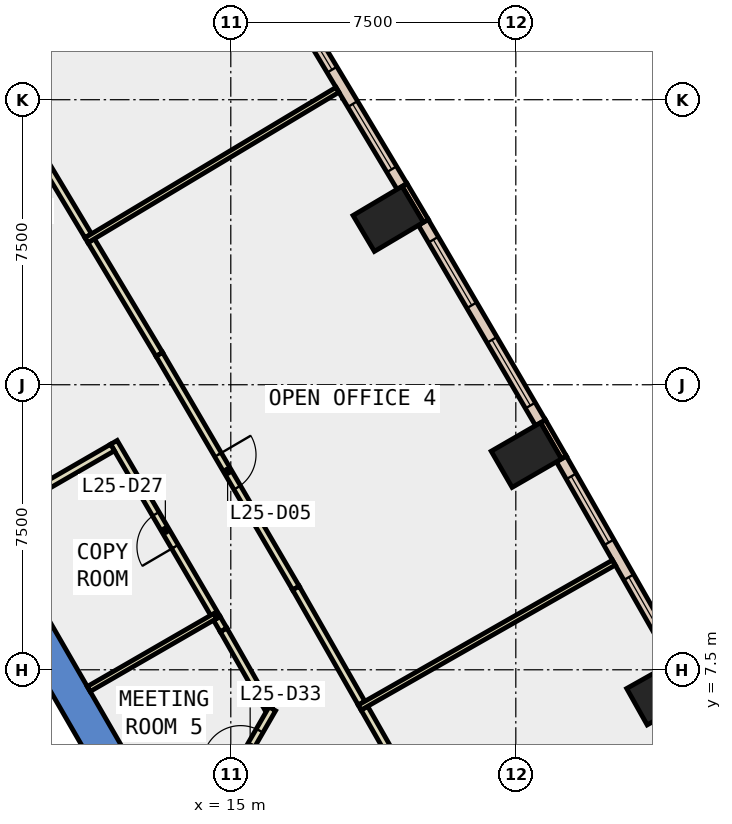
"""IFC4 building model, lengths in metres.
Left out: names, types, materials, properties, quantities, classifications, styles, units other than length and angle.
Written with IfcOpenShell. Run it as: python <this file> out.ifc"""

import sys

from ifc_helpers import new_model, si_unit, direction, frame, frame_2d, origin, origin_2d, place, context, subcontext, project, spatial, polyline, rectangle, outline, extrude, element, fill, save


model = new_model("IFC4")
c1 = context("Model", 3, precision=1e-05, world=origin(), true_north=direction((0.0, 1.0)))
c2 = subcontext(c1, "Body", "Model", "MODEL_VIEW")
j1 = project(units=[si_unit("LENGTHUNIT", "METRE"), si_unit("PLANEANGLEUNIT", "RADIAN")], contexts=[c1])
p1 = place(None, origin())
s1 = spatial("IfcSite", under=j1, at=p1, CompositionType="ELEMENT")
p2 = place(p1, origin())
s2 = spatial("IfcBuilding", under=s1, at=p2, CompositionType="ELEMENT")
p3 = place(p2, frame((0.0, 0.0, 116.0)))
s3 = spatial("IfcBuildingStorey", under=s2, at=p3, CompositionType="ELEMENT", Elevation=116.0)
for number, where, z_axis, x_axis in (
    (1, (26.341, 6.896, -0.4), (0.0, 0.0, 1.0), (-0.49, 0.872, 0.0)),
    (2, (22.777, 13.15, -0.4), (0.0, 0.0, 1.0), (-0.5, 0.866, 0.0)),
    (3, (19.143, 19.364, -0.4), (0.0, 0.0, 1.0), (-0.51, 0.86, 0.0)),
):
    element("IfcColumn", number, at=place(p3, frame(where, z_axis=z_axis, x_axis=x_axis)), inside=s3, PredefinedType="COLUMN", context=c2, shape_type="SweptSolid", body=[
        extrude(rectangle(XDim=1.1, YDim=1.5, at=origin_2d()), origin(), (0.0, 0.0, 1.0), 4.2),
    ])
p4 = place(p3, frame((0.0, 0.0, -0.4)))
e4 = element("IfcWall", 4, at=p4, inside=s3, PredefinedType="SHEAR", context=c2, shape_type="SweptSolid", body=[
    extrude(outline(polyline([(8.517, 11.748), (7.738, 11.298), (12.817, 2.5), (13.856, 2.5), (8.517, 11.748)])), origin(), (0.0, 0.0, 1.0), 4.2),
])
p5 = place(p3, frame((23.766, 13.086, 0.0), z_axis=(0.0, 0.0, 1.0), x_axis=(-0.499837685251, 0.86611909597, 0.0)))
e5 = element("IfcWall", 5, at=p5, inside=s3, PredefinedType="STANDARD", context=c2, shape_type="SweptSolid", body=[
    extrude(rectangle(XDim=1.1, YDim=0.15, at=frame_2d((0.55, 0.0))), origin(), (0.0, 0.0, 1.0), 3.8),
])
p6 = place(p3, frame((20.133, 19.312, 0.0), z_axis=(0.0, 0.0, 1.0), x_axis=(-0.510082245696, 0.860125631885, 0.0)))
e6 = element("IfcWall", 6, at=p6, inside=s3, PredefinedType="STANDARD", context=c2, shape_type="SweptSolid", body=[
    extrude(rectangle(XDim=1.1, YDim=0.15, at=frame_2d((0.55, 0.0))), origin(), (0.0, 0.0, 1.0), 3.8),
])
p7 = place(p3, frame((26.723, 7.74, 0.0), z_axis=(0.0, 0.0, 1.0), x_axis=(-0.495114366991, 0.868827810098, 0.0)))
e7 = element("IfcWall", 7, at=p7, inside=s3, PredefinedType="STANDARD", context=c2, shape_type="SweptSolid", body=[
    extrude(rectangle(XDim=6.11, YDim=0.3, at=frame_2d((3.055, 0.0))), origin(), (0.0, 0.0, 1.0), 3.8),
])
p8 = place(p7, frame((0.527, 0.0, 0.9)))
e8 = element("IfcOpeningElement", 8, at=p8, cuts=e7, PredefinedType="OPENING", context=c2, shape_type="SweptSolid", body=[
    extrude(rectangle(XDim=2.0, YDim=2.6, at=frame_2d((1.0, 1.3))), frame((0.0, 0.16, 0.0), z_axis=(0.0, -1.0, 0.0), x_axis=(1.0, 0.0, 0.0)), (0.0, 0.0, 1.0), 0.32),
])
p9 = place(p7, frame((3.582, 0.0, 0.9)))
e9 = element("IfcOpeningElement", 9, at=p9, cuts=e7, PredefinedType="OPENING", context=c2, shape_type="SweptSolid", body=[
    extrude(rectangle(XDim=2.0, YDim=2.6, at=frame_2d((1.0, 1.3))), frame((0.0, 0.16, 0.0), z_axis=(0.0, -1.0, 0.0), x_axis=(1.0, 0.0, 0.0)), (0.0, 0.0, 1.0), 0.32),
])
p10 = place(p3, frame((23.149, 13.999, 0.0), z_axis=(0.0, 0.0, 1.0), x_axis=(-0.504790055126, 0.863242144619, 0.0)))
e10 = element("IfcWall", 10, at=p10, inside=s3, PredefinedType="STANDARD", context=c2, shape_type="SweptSolid", body=[
    extrude(rectangle(XDim=6.109, YDim=0.3, at=frame_2d((3.055, 0.0))), origin(), (0.0, 0.0, 1.0), 3.8),
])
p11 = place(p10, frame((0.527, 0.0, 0.9)))
e11 = element("IfcOpeningElement", 11, at=p11, cuts=e10, PredefinedType="OPENING", context=c2, shape_type="SweptSolid", body=[
    extrude(rectangle(XDim=2.0, YDim=2.6, at=frame_2d((1.0, 1.3))), frame((0.0, 0.16, 0.0), z_axis=(0.0, -1.0, 0.0), x_axis=(1.0, 0.0, 0.0)), (0.0, 0.0, 1.0), 0.32),
])
p12 = place(p10, frame((3.582, 0.0, 0.9)))
e12 = element("IfcOpeningElement", 12, at=p12, cuts=e10, PredefinedType="OPENING", context=c2, shape_type="SweptSolid", body=[
    extrude(rectangle(XDim=2.0, YDim=2.6, at=frame_2d((1.0, 1.3))), frame((0.0, 0.16, 0.0), z_axis=(0.0, -1.0, 0.0), x_axis=(1.0, 0.0, 0.0)), (0.0, 0.0, 1.0), 0.32),
])
p13 = place(p3, frame((19.506, 20.217, 0.0), z_axis=(0.0, 0.0, 1.0), x_axis=(-0.514078503149, 0.857743139057, 0.0)))
e13 = element("IfcWall", 13, at=p13, inside=s3, PredefinedType="STANDARD", context=c2, shape_type="SweptSolid", body=[
    extrude(rectangle(XDim=6.11, YDim=0.3, at=frame_2d((3.055, 0.0))), origin(), (0.0, 0.0, 1.0), 3.8),
])
p14 = place(p13, frame((0.528, 0.0, 0.9)))
e14 = element("IfcOpeningElement", 14, at=p14, cuts=e13, PredefinedType="OPENING", context=c2, shape_type="SweptSolid", body=[
    extrude(rectangle(XDim=2.0, YDim=2.6, at=frame_2d((1.0, 1.3))), frame((0.0, 0.16, 0.0), z_axis=(0.0, -1.0, 0.0), x_axis=(1.0, 0.0, 0.0)), (0.0, 0.0, 1.0), 0.32),
])
p15 = place(p13, frame((3.583, 0.0, 0.9)))
e15 = element("IfcOpeningElement", 15, at=p15, cuts=e13, PredefinedType="OPENING", context=c2, shape_type="SweptSolid", body=[
    extrude(rectangle(XDim=2.0, YDim=2.6, at=frame_2d((1.0, 1.3))), frame((0.0, 0.16, 0.0), z_axis=(0.0, -1.0, 0.0), x_axis=(1.0, 0.0, 0.0)), (0.0, 0.0, 1.0), 0.32),
])
p16 = place(p3, frame((15.993, 6.473, 0.0), z_axis=(0.0, 0.0, 1.0), x_axis=(-0.495159881733, 0.86880187127, 0.0)))
e16 = element("IfcWall", 16, at=p16, inside=s3, PredefinedType="PARTITIONING", context=c2, shape_type="SweptSolid", body=[
    extrude(rectangle(XDim=2.391, YDim=0.2, at=frame_2d((1.195, 0.0))), origin(), (0.0, 0.0, 1.0), 3.8),
])
p17 = place(p3, frame((14.809, 8.55, 0.0), z_axis=(0.0, 0.0, 1.0), x_axis=(-0.50443330283, 0.86345066043, 0.0)))
e17 = element("IfcWall", 17, at=p17, inside=s3, PredefinedType="PARTITIONING", context=c2, shape_type="SweptSolid", body=[
    extrude(rectangle(XDim=0.351, YDim=0.2, at=frame_2d((0.175, 0.0))), origin(), (0.0, 0.0, 1.0), 3.8),
])
p18 = place(p3, frame((14.632, 8.853, 0.0), z_axis=(0.0, 0.0, 1.0), x_axis=(-0.504798859257, 0.863236996249, 0.0)))
e18 = element("IfcWall", 18, at=p18, inside=s3, PredefinedType="PARTITIONING", context=c2, shape_type="SweptSolid", body=[
    extrude(rectangle(XDim=5.365, YDim=0.2, at=frame_2d((2.682, 0.0))), origin(), (0.0, 0.0, 1.0), 3.8),
])
p19 = place(p18, frame((2.182, 0.0, 0.0)))
e19 = element("IfcOpeningElement", 19, at=p19, cuts=e18, PredefinedType="OPENING", context=c2, shape_type="SweptSolid", body=[
    extrude(rectangle(XDim=1.0, YDim=2.1, at=frame_2d((0.5, 1.05))), frame((0.0, 0.11, 0.0), z_axis=(0.0, -1.0, 0.0), x_axis=(1.0, 0.0, 0.0)), (0.0, 0.0, 1.0), 0.22),
])
p20 = place(p3, frame((11.888, 13.348, 0.0), z_axis=(0.0, 0.0, 1.0), x_axis=(-0.865959227195, -0.500114603702, 0.0)))
e20 = element("IfcWall", 20, at=p20, inside=s3, PredefinedType="PARTITIONING", context=c2, shape_type="SweptSolid", body=[
    extrude(rectangle(XDim=3.269, YDim=0.2, at=frame_2d((1.635, 0.0))), origin(), (0.0, 0.0, 1.0), 3.8),
])
p21 = place(p3, frame((18.515, 6.491, 0.0), z_axis=(0.0, 0.0, 1.0), x_axis=(0.495309264725, -0.868716715781, 0.0)))
e21 = element("IfcWall", 21, at=p21, inside=s3, PredefinedType="PARTITIONING", context=c2, shape_type="SweptSolid", body=[
    extrude(rectangle(XDim=3.487, YDim=0.2, at=frame_2d((1.743, 0.0))), origin(), (0.0, 0.0, 1.0), 3.8),
])
p22 = place(p3, frame((11.326, 18.79, 0.0), z_axis=(0.0, 0.0, 1.0), x_axis=(0.514155958966, -0.857696712049, 0.0)))
e22 = element("IfcWall", 22, at=p22, inside=s3, PredefinedType="PARTITIONING", context=c2, shape_type="SweptSolid", body=[
    extrude(rectangle(XDim=3.487, YDim=0.2, at=frame_2d((1.744, 0.0))), origin(), (0.0, 0.0, 1.0), 3.8),
])
p23 = place(p3, frame((13.119, 15.799, 0.0), z_axis=(0.0, 0.0, 1.0), x_axis=(0.504729598075, -0.863277494684, 0.0)))
e23 = element("IfcWall", 23, at=p23, inside=s3, PredefinedType="PARTITIONING", context=c2, shape_type="SweptSolid", body=[
    extrude(rectangle(XDim=7.123, YDim=0.2, at=frame_2d((3.562, 0.0))), origin(), (0.0, 0.0, 1.0), 3.8),
])
p24 = place(p23, frame((3.061, 0.0, 0.0)))
e24 = element("IfcOpeningElement", 24, at=p24, cuts=e23, PredefinedType="OPENING", context=c2, shape_type="SweptSolid", body=[
    extrude(rectangle(XDim=1.0, YDim=2.1, at=frame_2d((0.5, 1.05))), frame((0.0, 0.11, 0.0), z_axis=(0.0, -1.0, 0.0), x_axis=(1.0, 0.0, 0.0)), (0.0, 0.0, 1.0), 0.22),
])
p25 = place(p3, frame((16.714, 9.65, 0.0), z_axis=(0.0, 0.0, 1.0), x_axis=(0.495286549488, -0.868729666753, 0.0)))
e25 = element("IfcWall", 25, at=p25, inside=s3, PredefinedType="PARTITIONING", context=c2, shape_type="SweptSolid", body=[
    extrude(rectangle(XDim=3.487, YDim=0.2, at=frame_2d((1.743, 0.0))), origin(), (0.0, 0.0, 1.0), 3.8),
])
p26 = place(p3, frame((9.457, 21.909, 0.0), z_axis=(0.0, 0.0, 1.0), x_axis=(0.513949903813, -0.857820200491, 0.0)))
e26 = element("IfcWall", 26, at=p26, inside=s3, PredefinedType="PARTITIONING", context=c2, shape_type="SweptSolid", body=[
    extrude(rectangle(XDim=3.487, YDim=0.2, at=frame_2d((1.743, 0.0))), origin(), (0.0, 0.0, 1.0), 3.8),
])
p27 = place(p3, frame((11.261, 6.994, 0.0), z_axis=(0.0, 0.0, 1.0), x_axis=(0.86605248387, 0.499953092981, 0.0)))
e27 = element("IfcWall", 27, at=p27, inside=s3, PredefinedType="PARTITIONING", context=c2, shape_type="SweptSolid", body=[
    extrude(rectangle(XDim=3.848, YDim=0.15, at=frame_2d((1.924, 0.0))), origin(), (0.0, 0.0, 1.0), 3.8),
])
p28 = place(p3, frame((13.827, 2.55, 0.0), z_axis=(0.0, 0.0, 1.0), x_axis=(0.500045913515, 0.865998893981, 0.0)))
e28 = element("IfcWall", 28, at=p28, inside=s3, PredefinedType="PARTITIONING", context=c2, shape_type="SweptSolid", body=[
    extrude(rectangle(XDim=4.53, YDim=0.2, at=frame_2d((2.265, 0.0))), origin(), (0.0, 0.0, 1.0), 3.8),
])
p29 = place(p28, frame((1.765, 0.0, 0.0)))
e29 = element("IfcOpeningElement", 29, at=p29, cuts=e28, PredefinedType="OPENING", context=c2, shape_type="SweptSolid", body=[
    extrude(rectangle(XDim=1.0, YDim=2.1, at=frame_2d((0.5, 1.05))), frame((0.0, 0.11, 0.0), z_axis=(0.0, -1.0, 0.0), x_axis=(1.0, 0.0, 0.0)), (0.0, 0.0, 1.0), 0.22),
])
p30 = place(p28, frame((2.865, 0.0, 0.0)))
e30 = element("IfcOpeningElement", 30, at=p30, cuts=e28, PredefinedType="OPENING", context=c2, shape_type="SweptSolid", body=[
    extrude(rectangle(XDim=1.0, YDim=2.1, at=frame_2d((0.5, 1.05))), frame((0.0, 0.11, 0.0), z_axis=(0.0, -1.0, 0.0), x_axis=(1.0, 0.0, 0.0)), (0.0, 0.0, 1.0), 0.22),
])
p31 = place(p3, frame((18.391, 6.506, 0.0), z_axis=(0.0, 0.0, 1.0), x_axis=(0.868738258528, 0.495271479261, 0.0)))
e31 = element("IfcWall", 31, at=p31, inside=s3, PredefinedType="PARTITIONING", context=c2, shape_type="SweptSolid", body=[
    extrude(rectangle(XDim=7.701, YDim=0.15, at=frame_2d((3.85, 0.0))), origin(), (0.0, 0.0, 1.0), 3.8),
])
p32 = place(p3, frame((11.202, 18.803, 0.0), z_axis=(0.0, 0.0, 1.0), x_axis=(0.857778149162, 0.514020084062, 0.0)))
e32 = element("IfcWall", 32, at=p32, inside=s3, PredefinedType="PARTITIONING", context=c2, shape_type="SweptSolid", body=[
    extrude(rectangle(XDim=7.7, YDim=0.15, at=frame_2d((3.85, 0.0))), origin(), (0.0, 0.0, 1.0), 3.8),
])
p33 = place(p8, origin())
e33 = element("IfcWindow", 33, at=p33, inside=s3, PartitioningType="SINGLE_PANEL", PredefinedType="WINDOW", context=c2, shape_type="SweptSolid", body=[
    extrude(rectangle(XDim=2.0, YDim=2.6, at=frame_2d((1.0, 1.3))), frame((0.0, 0.03, 0.0), z_axis=(0.0, -1.0, 0.0), x_axis=(1.0, 0.0, 0.0)), (0.0, 0.0, 1.0), 0.06),
])
fill(e8, e33)
p34 = place(p9, origin())
e34 = element("IfcWindow", 34, at=p34, inside=s3, PartitioningType="SINGLE_PANEL", PredefinedType="WINDOW", context=c2, shape_type="SweptSolid", body=[
    extrude(rectangle(XDim=2.0, YDim=2.6, at=frame_2d((1.0, 1.3))), frame((0.0, 0.03, 0.0), z_axis=(0.0, -1.0, 0.0), x_axis=(1.0, 0.0, 0.0)), (0.0, 0.0, 1.0), 0.06),
])
fill(e9, e34)
p35 = place(p11, origin())
e35 = element("IfcWindow", 35, at=p35, inside=s3, PartitioningType="SINGLE_PANEL", PredefinedType="WINDOW", context=c2, shape_type="SweptSolid", body=[
    extrude(rectangle(XDim=2.0, YDim=2.6, at=frame_2d((1.0, 1.3))), frame((0.0, 0.03, 0.0), z_axis=(0.0, -1.0, 0.0), x_axis=(1.0, 0.0, 0.0)), (0.0, 0.0, 1.0), 0.06),
])
fill(e11, e35)
p36 = place(p12, origin())
e36 = element("IfcWindow", 36, at=p36, inside=s3, PartitioningType="SINGLE_PANEL", PredefinedType="WINDOW", context=c2, shape_type="SweptSolid", body=[
    extrude(rectangle(XDim=2.0, YDim=2.6, at=frame_2d((1.0, 1.3))), frame((0.0, 0.03, 0.0), z_axis=(0.0, -1.0, 0.0), x_axis=(1.0, 0.0, 0.0)), (0.0, 0.0, 1.0), 0.06),
])
fill(e12, e36)
p37 = place(p14, origin())
e37 = element("IfcWindow", 37, at=p37, inside=s3, PartitioningType="SINGLE_PANEL", PredefinedType="WINDOW", context=c2, shape_type="SweptSolid", body=[
    extrude(rectangle(XDim=2.0, YDim=2.6, at=frame_2d((1.0, 1.3))), frame((0.0, 0.03, 0.0), z_axis=(0.0, -1.0, 0.0), x_axis=(1.0, 0.0, 0.0)), (0.0, 0.0, 1.0), 0.06),
])
fill(e14, e37)
p38 = place(p15, origin())
e38 = element("IfcWindow", 38, at=p38, inside=s3, PartitioningType="SINGLE_PANEL", PredefinedType="WINDOW", context=c2, shape_type="SweptSolid", body=[
    extrude(rectangle(XDim=2.0, YDim=2.6, at=frame_2d((1.0, 1.3))), frame((0.0, 0.03, 0.0), z_axis=(0.0, -1.0, 0.0), x_axis=(1.0, 0.0, 0.0)), (0.0, 0.0, 1.0), 0.06),
])
fill(e15, e38)
p39 = place(p24, origin())
e39 = element("IfcDoor", 39, at=p39, inside=s3, OperationType="SINGLE_SWING_RIGHT", PredefinedType="DOOR", context=c2, shape_type="SweptSolid", body=[
    extrude(rectangle(XDim=1.0, YDim=2.1, at=frame_2d((0.5, 1.05))), frame((0.0, 0.025, 0.0), z_axis=(0.0, -1.0, 0.0), x_axis=(1.0, 0.0, 0.0)), (0.0, 0.0, 1.0), 0.05),
])
fill(e24, e39)
p40 = place(p19, origin())
e40 = element("IfcDoor", 40, at=p40, inside=s3, OperationType="SINGLE_SWING_LEFT", PredefinedType="DOOR", context=c2, shape_type="SweptSolid", body=[
    extrude(rectangle(XDim=1.0, YDim=2.1, at=frame_2d((0.5, 1.05))), frame((0.0, 0.025, 0.0), z_axis=(0.0, -1.0, 0.0), x_axis=(1.0, 0.0, 0.0)), (0.0, 0.0, 1.0), 0.05),
])
fill(e19, e40)
p41 = place(p30, origin())
e41 = element("IfcDoor", 41, at=p41, inside=s3, OperationType="SINGLE_SWING_RIGHT", PredefinedType="DOOR", context=c2, shape_type="SweptSolid", body=[
    extrude(rectangle(XDim=1.0, YDim=2.1, at=frame_2d((0.5, 1.05))), frame((0.0, 0.025, 0.0), z_axis=(0.0, -1.0, 0.0), x_axis=(1.0, 0.0, 0.0)), (0.0, 0.0, 1.0), 0.05),
])
fill(e30, e41)
save(model, sys.argv[1])
